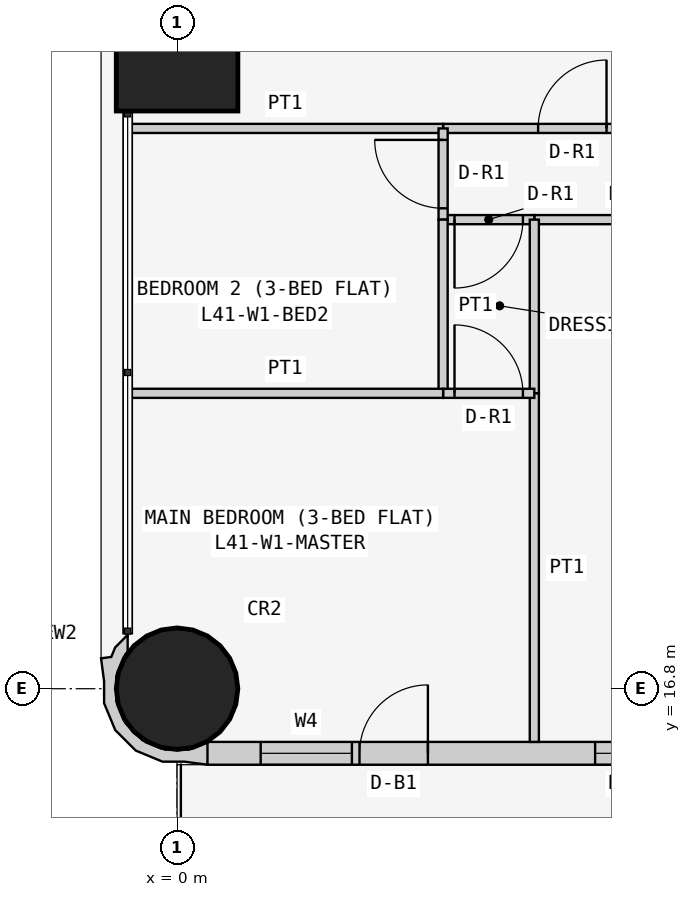
"""IFC4 building model, lengths in metres.
Left out: names, types, materials, properties, quantities, classifications, styles, units other than length and angle.
Written with IfcOpenShell. Run it as: python <this file> out.ifc"""

import sys

from ifc_helpers import new_model, si_unit, direction, frame, frame_2d, origin, origin_2d, place, context, subcontext, project, spatial, polyline, rectangle, circle, outline, extrude, element, fill, save


model = new_model("IFC4")
c1 = context("Model", 3, precision=1e-05, world=origin(), true_north=direction((0.0, 1.0)))
c2 = subcontext(c1, "Body", "Model", "MODEL_VIEW")
j1 = project(units=[si_unit("LENGTHUNIT", "METRE"), si_unit("PLANEANGLEUNIT", "RADIAN")], contexts=[c1])
p1 = place(None, origin())
s1 = spatial("IfcSite", under=j1, at=p1, CompositionType="ELEMENT")
p2 = place(p1, origin())
s2 = spatial("IfcBuilding", under=s1, at=p2, CompositionType="ELEMENT")
p3 = place(p2, frame((0.0, 0.0, 159.3)))
s3 = spatial("IfcBuildingStorey", under=s2, at=p3, CompositionType="ELEMENT", Elevation=159.3)
p4 = place(p3, frame((0.0, 16.8, 0.0), z_axis=(0.0, 0.0, 1.0), x_axis=(1.0, 0.0, 0.0)))
e1 = element("IfcColumn", 1, at=p4, inside=s3, PredefinedType="COLUMN", context=c2, shape_type="SweptSolid", body=[
    extrude(circle(Radius=0.8, at=origin_2d()), origin(), (0.0, 0.0, 1.0), 3.6),
])
p5 = place(p3, frame((0.0, 25.2, 0.0), z_axis=(0.0, 0.0, 1.0), x_axis=(1.0, 0.0, 0.0)))
e2 = element("IfcColumn", 2, at=p5, inside=s3, PredefinedType="COLUMN", context=c2, shape_type="SweptSolid", body=[
    extrude(rectangle(XDim=1.6, YDim=1.6, at=origin_2d()), origin(), (0.0, 0.0, 1.0), 3.6),
])
p6 = place(p3, frame((0.4, 15.95, 0.0), z_axis=(0.0, 0.0, 1.0), x_axis=(1.0, 0.0, 0.0)))
e3 = element("IfcWall", 3, at=p6, inside=s3, PredefinedType="SOLIDWALL", context=c2, shape_type="SweptSolid", body=[
    extrude(rectangle(XDim=15.7, YDim=0.3, at=frame_2d((7.85, 0.0))), origin(), (0.0, 0.0, 1.0), 3.45),
])
p7 = place(p6, frame((12.4, 0.0, 0.9)))
e4 = element("IfcOpeningElement", 4, at=p7, cuts=e3, PredefinedType="OPENING", context=c2, shape_type="SweptSolid", body=[
    extrude(rectangle(XDim=1.8, YDim=1.5, at=frame_2d((0.9, 0.75))), frame((0.0, 0.16, 0.0), z_axis=(0.0, -1.0, 0.0), x_axis=(1.0, 0.0, 0.0)), (0.0, 0.0, 1.0), 0.32),
])
p8 = place(p6, frame((9.55, 0.0, 1.5)))
e5 = element("IfcOpeningElement", 5, at=p8, cuts=e3, PredefinedType="OPENING", context=c2, shape_type="SweptSolid", body=[
    extrude(rectangle(XDim=0.9, YDim=0.7, at=frame_2d((0.45, 0.35))), frame((0.0, 0.16, 0.0), z_axis=(0.0, -1.0, 0.0), x_axis=(1.0, 0.0, 0.0)), (0.0, 0.0, 1.0), 0.32),
])
p9 = place(p6, frame((5.1, 0.0, 0.9)))
e6 = element("IfcOpeningElement", 6, at=p9, cuts=e3, PredefinedType="OPENING", context=c2, shape_type="SweptSolid", body=[
    extrude(rectangle(XDim=1.8, YDim=1.5, at=frame_2d((0.9, 0.75))), frame((0.0, 0.16, 0.0), z_axis=(0.0, -1.0, 0.0), x_axis=(1.0, 0.0, 0.0)), (0.0, 0.0, 1.0), 0.32),
])
p10 = place(p6, frame((2.0, 0.0, 0.0)))
e7 = element("IfcOpeningElement", 7, at=p10, cuts=e3, PredefinedType="OPENING", context=c2, shape_type="SweptSolid", body=[
    extrude(rectangle(XDim=0.9, YDim=2.4, at=frame_2d((0.45, 1.2))), frame((0.0, 0.16, 0.0), z_axis=(0.0, -1.0, 0.0), x_axis=(1.0, 0.0, 0.0)), (0.0, 0.0, 1.0), 0.32),
])
p11 = place(p6, frame((0.7, 0.0, 0.9)))
e8 = element("IfcOpeningElement", 8, at=p11, cuts=e3, PredefinedType="OPENING", context=c2, shape_type="SweptSolid", body=[
    extrude(rectangle(XDim=1.2, YDim=1.5, at=frame_2d((0.6, 0.75))), frame((0.0, 0.16, 0.0), z_axis=(0.0, -1.0, 0.0), x_axis=(1.0, 0.0, 0.0)), (0.0, 0.0, 1.0), 0.32),
])
p12 = place(p3, frame((-0.595, 17.448, 0.0), z_axis=(0.0, 0.0, 1.0), x_axis=(-0.93923434088, -0.343276641956, 0.0)))
e9 = element("IfcWall", 9, at=p12, inside=s3, PredefinedType="SOLIDWALL", context=c2, shape_type="SweptSolid", body=[
    extrude(outline(polyline([(-0.369, 1.89), (-0.509, 1.621), (-0.491, 1.614), (-0.479, 1.609), (-0.211, 1.62), (0.088, 1.511), (0.323, 1.295), (0.457, 1.006), (0.47, 0.688), (0.361, 0.389), (0.146, 0.154), (0.108, 0.137), (0.031, -0.075), (0.241, 0.023), (0.334, 0.124), (0.465, 0.094), (0.532, 0.393), (0.631, 0.663), (0.614, 1.045), (0.453, 1.391), (0.172, 1.649), (-0.098, 1.748), (-0.369, 1.89)])), origin(), (0.0, 0.0, 1.0), 3.45),
])
p13 = place(p3, frame((3.5, 24.171, 0.0), z_axis=(0.0, 0.0, 1.0), x_axis=(1.0, 0.0, 0.0)))
e10 = element("IfcWall", 10, at=p13, inside=s3, PredefinedType="PARTITIONING", context=c2, shape_type="SweptSolid", body=[
    extrude(rectangle(XDim=2.7, YDim=0.12, at=frame_2d((1.35, 0.0))), origin(), (0.0, 0.0, 1.0), 3.45),
])
p14 = place(p13, frame((1.25, 0.0, 0.0)))
e11 = element("IfcOpeningElement", 11, at=p14, cuts=e10, PredefinedType="OPENING", context=c2, shape_type="SweptSolid", body=[
    extrude(rectangle(XDim=0.9, YDim=2.1, at=frame_2d((0.45, 1.05))), frame((0.0, 0.07, 0.0), z_axis=(0.0, -1.0, 0.0), x_axis=(1.0, 0.0, 0.0)), (0.0, 0.0, 1.0), 0.14),
])
p15 = place(p3, frame((-0.65, 24.171, 0.0), z_axis=(0.0, 0.0, 1.0), x_axis=(1.0, 0.0, 0.0)))
e12 = element("IfcWall", 12, at=p15, inside=s3, PredefinedType="PARTITIONING", context=c2, shape_type="SweptSolid", body=[
    extrude(rectangle(XDim=4.15, YDim=0.12, at=frame_2d((2.075, 0.0))), origin(), (0.0, 0.0, 1.0), 3.45),
])
p16 = place(p3, frame((4.7, 22.971, 0.0), z_axis=(0.0, 0.0, 1.0), x_axis=(1.0, 0.0, 0.0)))
e13 = element("IfcWall", 13, at=p16, inside=s3, PredefinedType="PARTITIONING", context=c2, shape_type="SweptSolid", body=[
    extrude(rectangle(XDim=4.9, YDim=0.12, at=frame_2d((2.45, 0.0))), origin(), (0.0, 0.0, 1.0), 3.45),
])
p17 = place(p16, frame((1.65, 0.0, 0.0)))
e14 = element("IfcOpeningElement", 14, at=p17, cuts=e13, PredefinedType="OPENING", context=c2, shape_type="SweptSolid", body=[
    extrude(rectangle(XDim=0.9, YDim=2.1, at=frame_2d((0.45, 1.05))), frame((0.0, 0.07, 0.0), z_axis=(0.0, -1.0, 0.0), x_axis=(1.0, 0.0, 0.0)), (0.0, 0.0, 1.0), 0.14),
])
p18 = place(p3, frame((3.5, 22.971, 0.0), z_axis=(0.0, 0.0, 1.0), x_axis=(1.0, 0.0, 0.0)))
e15 = element("IfcWall", 15, at=p18, inside=s3, PredefinedType="PARTITIONING", context=c2, shape_type="SweptSolid", body=[
    extrude(rectangle(XDim=1.2, YDim=0.12, at=frame_2d((0.6, 0.0))), origin(), (0.0, 0.0, 1.0), 3.45),
])
p19 = place(p18, frame((0.15, 0.0, 0.0)))
e16 = element("IfcOpeningElement", 16, at=p19, cuts=e15, PredefinedType="OPENING", context=c2, shape_type="SweptSolid", body=[
    extrude(rectangle(XDim=0.9, YDim=2.1, at=frame_2d((0.45, 1.05))), frame((0.0, 0.07, 0.0), z_axis=(0.0, -1.0, 0.0), x_axis=(1.0, 0.0, 0.0)), (0.0, 0.0, 1.0), 0.14),
])
p20 = place(p3, frame((3.5, 24.171, 0.0), z_axis=(0.0, 0.0, 1.0), x_axis=(0.0, -1.0, 0.0)))
e17 = element("IfcWall", 17, at=p20, inside=s3, PredefinedType="PARTITIONING", context=c2, shape_type="SweptSolid", body=[
    extrude(rectangle(XDim=1.2, YDim=0.12, at=frame_2d((0.6, 0.0))), origin(), (0.0, 0.0, 1.0), 3.45),
])
p21 = place(p20, frame((0.151, 0.0, 0.0)))
e18 = element("IfcOpeningElement", 18, at=p21, cuts=e17, PredefinedType="OPENING", context=c2, shape_type="SweptSolid", body=[
    extrude(rectangle(XDim=0.9, YDim=2.1, at=frame_2d((0.45, 1.05))), frame((0.0, 0.07, 0.0), z_axis=(0.0, -1.0, 0.0), x_axis=(1.0, 0.0, 0.0)), (0.0, 0.0, 1.0), 0.14),
])
p22 = place(p3, frame((4.7, 22.971, 0.0), z_axis=(0.0, 0.0, 1.0), x_axis=(0.0, -1.0, 0.0)))
e19 = element("IfcWall", 19, at=p22, inside=s3, PredefinedType="PARTITIONING", context=c2, shape_type="SweptSolid", body=[
    extrude(rectangle(XDim=2.285, YDim=0.12, at=frame_2d((1.143, 0.0))), origin(), (0.0, 0.0, 1.0), 3.45),
])
p23 = place(p3, frame((4.7, 20.686, 0.0), z_axis=(0.0, 0.0, 1.0), x_axis=(0.0, -1.0, 0.0)))
e20 = element("IfcWall", 20, at=p23, inside=s3, PredefinedType="PARTITIONING", context=c2, shape_type="SweptSolid", body=[
    extrude(rectangle(XDim=4.586, YDim=0.12, at=frame_2d((2.293, 0.0))), origin(), (0.0, 0.0, 1.0), 3.45),
])
p24 = place(p3, frame((3.5, 22.971, 0.0), z_axis=(0.0, 0.0, 1.0), x_axis=(0.0, -1.0, 0.0)))
e21 = element("IfcWall", 21, at=p24, inside=s3, PredefinedType="PARTITIONING", context=c2, shape_type="SweptSolid", body=[
    extrude(rectangle(XDim=2.285, YDim=0.12, at=frame_2d((1.143, 0.0))), origin(), (0.0, 0.0, 1.0), 3.45),
])
p25 = place(p3, frame((3.5, 20.686, 0.0), z_axis=(0.0, 0.0, 1.0), x_axis=(1.0, 0.0, 0.0)))
e22 = element("IfcWall", 22, at=p25, inside=s3, PredefinedType="PARTITIONING", context=c2, shape_type="SweptSolid", body=[
    extrude(rectangle(XDim=1.2, YDim=0.12, at=frame_2d((0.6, 0.0))), origin(), (0.0, 0.0, 1.0), 3.45),
])
p26 = place(p25, frame((0.15, 0.0, 0.0)))
e23 = element("IfcOpeningElement", 23, at=p26, cuts=e22, PredefinedType="OPENING", context=c2, shape_type="SweptSolid", body=[
    extrude(rectangle(XDim=0.9, YDim=2.1, at=frame_2d((0.45, 1.05))), frame((0.0, 0.07, 0.0), z_axis=(0.0, -1.0, 0.0), x_axis=(1.0, 0.0, 0.0)), (0.0, 0.0, 1.0), 0.14),
])
p27 = place(p3, frame((-0.65, 20.686, 0.0), z_axis=(0.0, 0.0, 1.0), x_axis=(1.0, 0.0, 0.0)))
e24 = element("IfcWall", 24, at=p27, inside=s3, PredefinedType="PARTITIONING", context=c2, shape_type="SweptSolid", body=[
    extrude(rectangle(XDim=4.15, YDim=0.12, at=frame_2d((2.075, 0.0))), origin(), (0.0, 0.0, 1.0), 3.45),
])
p28 = place(p9, origin())
e25 = element("IfcWindow", 25, at=p28, inside=s3, PartitioningType="SINGLE_PANEL", PredefinedType="WINDOW", context=c2, shape_type="SweptSolid", body=[
    extrude(rectangle(XDim=1.8, YDim=1.5, at=frame_2d((0.9, 0.75))), frame((0.0, 0.03, 0.0), z_axis=(0.0, -1.0, 0.0), x_axis=(1.0, 0.0, 0.0)), (0.0, 0.0, 1.0), 0.06),
])
fill(e6, e25)
p29 = place(p10, origin())
e26 = element("IfcDoor", 26, at=p29, inside=s3, OperationType="SINGLE_SWING_RIGHT", PredefinedType="DOOR", context=c2, shape_type="SweptSolid", body=[
    extrude(rectangle(XDim=0.9, YDim=2.4, at=frame_2d((0.45, 1.2))), frame((0.0, 0.025, 0.0), z_axis=(0.0, -1.0, 0.0), x_axis=(1.0, 0.0, 0.0)), (0.0, 0.0, 1.0), 0.05),
])
fill(e7, e26)
p30 = place(p11, origin())
e27 = element("IfcWindow", 27, at=p30, inside=s3, PartitioningType="SINGLE_PANEL", PredefinedType="WINDOW", context=c2, shape_type="SweptSolid", body=[
    extrude(rectangle(XDim=1.2, YDim=1.5, at=frame_2d((0.6, 0.75))), frame((0.0, 0.03, 0.0), z_axis=(0.0, -1.0, 0.0), x_axis=(1.0, 0.0, 0.0)), (0.0, 0.0, 1.0), 0.06),
])
fill(e8, e27)
p31 = place(p14, origin())
e28 = element("IfcDoor", 28, at=p31, inside=s3, OperationType="SINGLE_SWING_RIGHT", PredefinedType="DOOR", context=c2, shape_type="SweptSolid", body=[
    extrude(rectangle(XDim=0.9, YDim=2.1, at=frame_2d((0.45, 1.05))), frame((0.0, 0.025, 0.0), z_axis=(0.0, -1.0, 0.0), x_axis=(1.0, 0.0, 0.0)), (0.0, 0.0, 1.0), 0.05),
])
fill(e11, e28)
p32 = place(p19, frame((0.9, 0.0, 0.0), z_axis=(0.0, 0.0, 1.0), x_axis=(-1.0, 0.0, 0.0)))
e29 = element("IfcDoor", 29, at=p32, inside=s3, OperationType="SINGLE_SWING_RIGHT", PredefinedType="DOOR", context=c2, shape_type="SweptSolid", body=[
    extrude(rectangle(XDim=0.9, YDim=2.1, at=frame_2d((0.45, 1.05))), frame((0.0, 0.025, 0.0), z_axis=(0.0, -1.0, 0.0), x_axis=(1.0, 0.0, 0.0)), (0.0, 0.0, 1.0), 0.05),
])
fill(e16, e29)
p33 = place(p26, origin())
e30 = element("IfcDoor", 30, at=p33, inside=s3, OperationType="SINGLE_SWING_LEFT", PredefinedType="DOOR", context=c2, shape_type="SweptSolid", body=[
    extrude(rectangle(XDim=0.9, YDim=2.1, at=frame_2d((0.45, 1.05))), frame((0.0, 0.025, 0.0), z_axis=(0.0, -1.0, 0.0), x_axis=(1.0, 0.0, 0.0)), (0.0, 0.0, 1.0), 0.05),
])
fill(e23, e30)
p34 = place(p21, frame((0.9, 0.0, 0.0), z_axis=(0.0, 0.0, 1.0), x_axis=(-1.0, 0.0, 0.0)))
e31 = element("IfcDoor", 31, at=p34, inside=s3, OperationType="SINGLE_SWING_RIGHT", PredefinedType="DOOR", context=c2, shape_type="SweptSolid", body=[
    extrude(rectangle(XDim=0.9, YDim=2.1, at=frame_2d((0.45, 1.05))), frame((0.0, 0.025, 0.0), z_axis=(0.0, -1.0, 0.0), x_axis=(1.0, 0.0, 0.0)), (0.0, 0.0, 1.0), 0.05),
])
fill(e18, e31)
save(model, sys.argv[1])
